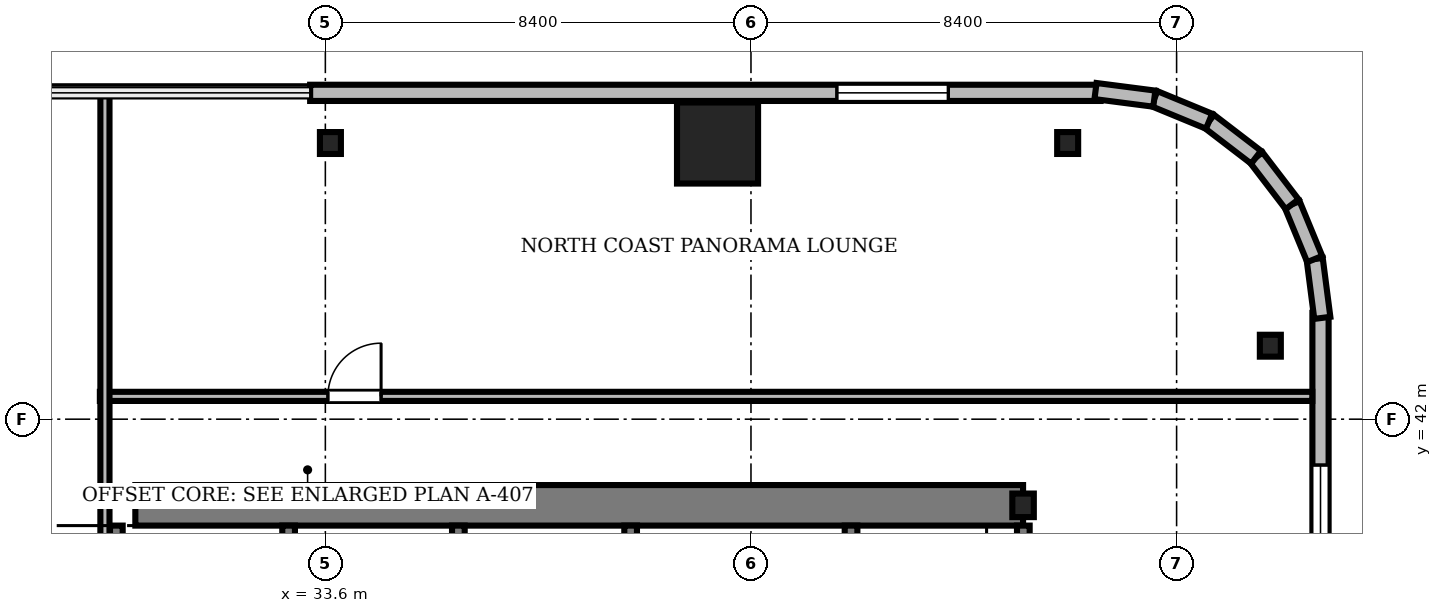
"""IFC4 building model, lengths in metres.
Left out: names, types, materials, properties, quantities, classifications, styles, units other than length and angle.
Written with IfcOpenShell. Run it as: python <this file> out.ifc"""

import sys

from ifc_helpers import new_model, si_unit, direction, frame, frame_2d, origin, origin_2d, place, context, subcontext, project, spatial, rectangle, i_section, extrude, source, transform, mapped, element, fill, save


model = new_model("IFC4")
c1 = context("Model", 3, precision=1e-05, world=origin(), true_north=direction((0.0, 1.0)))
c2 = subcontext(c1, "Body", "Model", "MODEL_VIEW")
j1 = project(units=[si_unit("LENGTHUNIT", "METRE"), si_unit("PLANEANGLEUNIT", "RADIAN")], contexts=[c1])
p1 = place(None, origin())
s1 = spatial("IfcSite", under=j1, at=p1, CompositionType="ELEMENT")
p2 = place(p1, origin())
s2 = spatial("IfcBuilding", under=s1, at=p2, CompositionType="ELEMENT")
p3 = place(p2, frame((0.0, 0.0, 159.4)))
s3 = spatial("IfcBuildingStorey", under=s2, at=p3, CompositionType="ELEMENT", Elevation=159.4)
m1 = source(origin(), c2, "Body", "SweptSolid", [
    extrude(rectangle(XDim=17.52, YDim=0.8, at=frame_2d((8.76, 0.0))), origin(), (0.0, 0.0, 1.0), 3.46),
])
p4 = place(p3, frame((29.85, 40.3, 0.0), z_axis=(0.0, 0.0, 1.0), x_axis=(1.0, 0.0, 0.0)))
e1 = element("IfcWall", 1, at=p4, inside=s3, PredefinedType="SHEAR", context=c2, shape_type="MappedRepresentation", body=[
    mapped(m1, transform((0.0, 0.0, 0.0), scale=1.0)),
])
m2 = source(origin(), c2, "Body", "SweptSolid", [
    extrude(i_section(OverallWidth=0.424, OverallDepth=0.465, WebThickness=0.035, FlangeThickness=0.056, FilletRadius=0.015, at=origin_2d()), origin(), (0.0, 0.0, 1.0), 3.46),
])
p5 = place(p3, frame((47.37, 40.3, 0.0), z_axis=(0.0, 0.0, 1.0), x_axis=(1.0, 0.0, 0.0)))
e2 = element("IfcColumn", 2, at=p5, inside=s3, PredefinedType="COLUMN", context=c2, shape_type="MappedRepresentation", body=[
    mapped(m2, transform((0.0, 0.0, 0.0), scale=1.0)),
])
m3 = source(origin(), c2, "Body", "SweptSolid", [
    extrude(rectangle(XDim=1.6, YDim=1.6, at=origin_2d()), origin(), (0.0, 0.0, 1.0), 3.46),
])
p6 = place(p3, frame((41.34, 47.45, 0.0), z_axis=(0.0, 0.0, 1.0), x_axis=(1.0, 0.0, 0.0)))
e3 = element("IfcColumn", 3, at=p6, inside=s3, PredefinedType="COLUMN", context=c2, shape_type="MappedRepresentation", body=[
    mapped(m3, transform((0.0, 0.0, 0.0), scale=1.0)),
])
m4 = source(origin(), c2, "Body", "SweptSolid", [
    extrude(i_section(OverallWidth=0.414, OverallDepth=0.432, WebThickness=0.026, FlangeThickness=0.04, FilletRadius=0.015, at=origin_2d()), origin(), (0.0, 0.0, 1.0), 3.46),
])
for number, where, z_axis, x_axis in (
    (4, (52.25, 43.45, 0.0), (0.0, 0.0, 1.0), (1.0, 0.0, 0.0)),
    (5, (48.25, 47.45, 0.0), (0.0, 0.0, 1.0), (1.0, 0.0, 0.0)),
    (6, (33.7, 47.45, 0.0), (0.0, 0.0, 1.0), (1.0, 0.0, 0.0)),
):
    element("IfcColumn", number, at=place(p3, frame(where, z_axis=z_axis, x_axis=x_axis)), inside=s3, PredefinedType="COLUMN", context=c2, shape_type="MappedRepresentation", body=[
        mapped(m4, transform((0.0, 0.0, 0.0), scale=1.0)),
    ])
m5 = source(origin(), c2, "Body", "SweptSolid", [
    extrude(rectangle(XDim=15.6, YDim=0.32, at=frame_2d((7.8, 0.0))), origin(), (0.0, 0.0, 1.0), 3.46),
])
p7 = place(p3, frame((48.9, 48.44, 0.0), z_axis=(0.0, 0.0, 1.0), x_axis=(-1.0, 0.0, 0.0)))
e7 = element("IfcWall", 7, at=p7, inside=s3, PredefinedType="SOLIDWALL", context=c2, shape_type="MappedRepresentation", body=[
    mapped(m5, transform((0.0, 0.0, 0.0), scale=1.0)),
])
m6 = source(origin(), c2, "Body", "SweptSolid", [
    extrude(rectangle(XDim=2.2, YDim=2.4, at=frame_2d((1.1, 1.2))), frame((0.0, 0.17, 0.0), z_axis=(0.0, -1.0, 0.0), x_axis=(1.0, 0.0, 0.0)), (0.0, 0.0, 1.0), 0.34),
])
p8 = place(p7, frame((3.005, 0.0, 0.72)))
e8 = element("IfcOpeningElement", 8, at=p8, cuts=e7, PredefinedType="OPENING", context=c2, shape_type="MappedRepresentation", body=[
    mapped(m6, transform((0.0, 0.0, 0.0), scale=1.0)),
])
m7 = source(origin(), c2, "Body", "SweptSolid", [
    extrude(rectangle(XDim=15.6, YDim=0.32, at=frame_2d((7.8, 0.0))), origin(), (0.0, 0.0, 1.0), 3.46),
])
p9 = place(p3, frame((53.24, 28.5, 0.0), z_axis=(0.0, 0.0, 1.0), x_axis=(0.0, 1.0, 0.0)))
e9 = element("IfcWall", 9, at=p9, inside=s3, PredefinedType="SOLIDWALL", context=c2, shape_type="MappedRepresentation", body=[
    mapped(m7, transform((0.0, 0.0, 0.0), scale=1.0)),
])
p10 = place(p9, frame((10.395, 0.0, 0.72)))
e10 = element("IfcOpeningElement", 10, at=p10, cuts=e9, PredefinedType="OPENING", context=c2, shape_type="MappedRepresentation", body=[
    mapped(m6, transform((0.0, 0.0, 0.0), scale=1.0)),
])
m8 = source(origin(), c2, "Body", "SweptSolid", [
    extrude(rectangle(XDim=1.17, YDim=0.32, at=frame_2d((0.585, 0.0))), origin(), (0.0, 0.0, 1.0), 3.46),
])
p11 = place(p3, frame((53.276, 44.0, 0.0), z_axis=(0.0, 0.0, 1.0), x_axis=(-0.128295670475, 0.991735963317, 0.0)))
e11 = element("IfcWall", 11, at=p11, inside=s3, PredefinedType="SOLIDWALL", context=c2, shape_type="MappedRepresentation", body=[
    mapped(m8, transform((0.0, 0.0, 0.0), scale=1.0)),
])
m9 = source(origin(), c2, "Body", "SweptSolid", [
    extrude(rectangle(XDim=1.169, YDim=0.32, at=frame_2d((0.584, 0.0))), origin(), (0.0, 0.0, 1.0), 3.46),
])
p12 = place(p3, frame((53.125, 45.16, 0.0), z_axis=(0.0, 0.0, 1.0), x_axis=(-0.381054331552, 0.924552646638, 0.0)))
e12 = element("IfcWall", 12, at=p12, inside=s3, PredefinedType="SOLIDWALL", context=c2, shape_type="MappedRepresentation", body=[
    mapped(m9, transform((0.0, 0.0, 0.0), scale=1.0)),
])
m10 = source(origin(), c2, "Body", "SweptSolid", [
    extrude(rectangle(XDim=1.169, YDim=0.32, at=frame_2d((0.584, 0.0))), origin(), (0.0, 0.0, 1.0), 3.46),
])
p13 = place(p3, frame((52.68, 46.241, 0.0), z_axis=(0.0, 0.0, 1.0), x_axis=(-0.608387696831, 0.793639975269, 0.0)))
e13 = element("IfcWall", 13, at=p13, inside=s3, PredefinedType="SOLIDWALL", context=c2, shape_type="MappedRepresentation", body=[
    mapped(m10, transform((0.0, 0.0, 0.0), scale=1.0)),
])
m11 = source(origin(), c2, "Body", "SweptSolid", [
    extrude(rectangle(XDim=1.169, YDim=0.32, at=frame_2d((0.584, 0.0))), origin(), (0.0, 0.0, 1.0), 3.46),
])
p14 = place(p3, frame((51.969, 47.169, 0.0), z_axis=(0.0, 0.0, 1.0), x_axis=(-0.793663520347, 0.608356981114, 0.0)))
e14 = element("IfcWall", 14, at=p14, inside=s3, PredefinedType="SOLIDWALL", context=c2, shape_type="MappedRepresentation", body=[
    mapped(m11, transform((0.0, 0.0, 0.0), scale=1.0)),
])
p15 = place(p3, frame((51.041, 47.88, 0.0), z_axis=(0.0, 0.0, 1.0), x_axis=(-0.924552646638, 0.381054331552, 0.0)))
e15 = element("IfcWall", 15, at=p15, inside=s3, PredefinedType="SOLIDWALL", context=c2, shape_type="MappedRepresentation", body=[
    mapped(m9, transform((0.0, 0.0, 0.0), scale=1.0)),
])
p16 = place(p3, frame((49.96, 48.325, 0.0), z_axis=(0.0, 0.0, 1.0), x_axis=(-0.991735963317, 0.128295670475, 0.0)))
e16 = element("IfcWall", 16, at=p16, inside=s3, PredefinedType="SOLIDWALL", context=c2, shape_type="MappedRepresentation", body=[
    mapped(m8, transform((0.0, 0.0, 0.0), scale=1.0)),
])
m12 = source(origin(), c2, "Body", "SweptSolid", [
    extrude(rectangle(XDim=9.25, YDim=0.25, at=frame_2d((4.625, 0.0))), origin(), (0.0, 0.0, 1.0), 3.5),
])
for number, where, z_axis, x_axis in (
    (17, (29.475, 30.65, 0.0), (0.0, 0.0, 1.0), (0.0, 1.0, 0.0)),
    (18, (32.875, 30.65, 0.0), (0.0, 0.0, 1.0), (0.0, 1.0, 0.0)),
    (19, (36.225, 30.65, 0.0), (0.0, 0.0, 1.0), (0.0, 1.0, 0.0)),
    (20, (39.625, 30.65, 0.0), (0.0, 0.0, 1.0), (0.0, 1.0, 0.0)),
    (21, (43.975, 30.65, 0.0), (0.0, 0.0, 1.0), (0.0, 1.0, 0.0)),
    (22, (47.375, 30.65, 0.0), (0.0, 0.0, 1.0), (0.0, 1.0, 0.0)),
):
    element("IfcWall", number, at=place(p3, frame(where, z_axis=z_axis, x_axis=x_axis)), inside=s3, PredefinedType="SOLIDWALL", context=c2, shape_type="MappedRepresentation", body=[
        mapped(m12, transform((0.0, 0.0, 0.0), scale=1.0)),
    ])
m13 = source(origin(), c2, "Body", "SweptSolid", [
    extrude(rectangle(XDim=23.928, YDim=0.18, at=frame_2d((11.964, 0.0))), origin(), (0.0, 0.0, 1.0), 2.702),
])
p17 = place(p3, frame((29.15, 42.45, 0.0), z_axis=(0.0, 0.0, 1.0), x_axis=(1.0, 0.0, 0.0)))
e23 = element("IfcWall", 23, at=p17, inside=s3, PredefinedType="PARTITIONING", context=c2, shape_type="MappedRepresentation", body=[
    mapped(m13, transform((0.0, 0.0, 0.0), scale=1.0)),
])
m14 = source(origin(), c2, "Body", "SweptSolid", [
    extrude(rectangle(XDim=1.05, YDim=2.2, at=frame_2d((0.525, 1.1))), frame((0.0, 0.1, 0.0), z_axis=(0.0, -1.0, 0.0), x_axis=(1.0, 0.0, 0.0)), (0.0, 0.0, 1.0), 0.2),
])
p18 = place(p17, frame((4.5, 0.0, 0.0)))
e24 = element("IfcOpeningElement", 24, at=p18, cuts=e23, PredefinedType="OPENING", context=c2, shape_type="MappedRepresentation", body=[
    mapped(m14, transform((0.0, 0.0, 0.0), scale=1.0)),
])
m15 = source(origin(), c2, "Body", "SweptSolid", [
    extrude(rectangle(XDim=11.45, YDim=0.18, at=frame_2d((5.725, 0.0))), origin(), (0.0, 0.0, 1.0), 2.702),
])
p19 = place(p3, frame((29.25, 37.02, 0.0), z_axis=(0.0, 0.0, 1.0), x_axis=(0.0, 1.0, 0.0)))
e25 = element("IfcWall", 25, at=p19, inside=s3, PredefinedType="PARTITIONING", context=c2, shape_type="MappedRepresentation", body=[
    mapped(m15, transform((0.0, 0.0, 0.0), scale=1.0)),
])
m16 = source(origin(), c2, "Body", "SweptSolid", [
    extrude(rectangle(XDim=2.2, YDim=2.4, at=frame_2d((1.1, 1.2))), frame((0.0, 0.03, 0.0), z_axis=(0.0, -1.0, 0.0), x_axis=(1.0, 0.0, 0.0)), (0.0, 0.0, 1.0), 0.06),
])
p20 = place(p8, origin())
e26 = element("IfcWindow", 26, at=p20, inside=s3, PartitioningType="SINGLE_PANEL", PredefinedType="WINDOW", context=c2, shape_type="MappedRepresentation", body=[
    mapped(m16, transform((0.0, 0.0, 0.0), scale=1.0)),
])
fill(e8, e26)
p21 = place(p10, origin())
e27 = element("IfcWindow", 27, at=p21, inside=s3, PartitioningType="SINGLE_PANEL", PredefinedType="WINDOW", context=c2, shape_type="MappedRepresentation", body=[
    mapped(m16, transform((0.0, 0.0, 0.0), scale=1.0)),
])
fill(e10, e27)
m17 = source(origin(), c2, "Body", "SweptSolid", [
    extrude(rectangle(XDim=1.05, YDim=2.2, at=frame_2d((0.525, 1.1))), frame((0.0, 0.025, 0.0), z_axis=(0.0, -1.0, 0.0), x_axis=(1.0, 0.0, 0.0)), (0.0, 0.0, 1.0), 0.05),
])
p22 = place(p18, origin())
e28 = element("IfcDoor", 28, at=p22, inside=s3, OperationType="SINGLE_SWING_RIGHT", PredefinedType="DOOR", context=c2, shape_type="MappedRepresentation", body=[
    mapped(m17, transform((0.0, 0.0, 0.0), scale=1.0)),
])
fill(e24, e28)
save(model, sys.argv[1])
